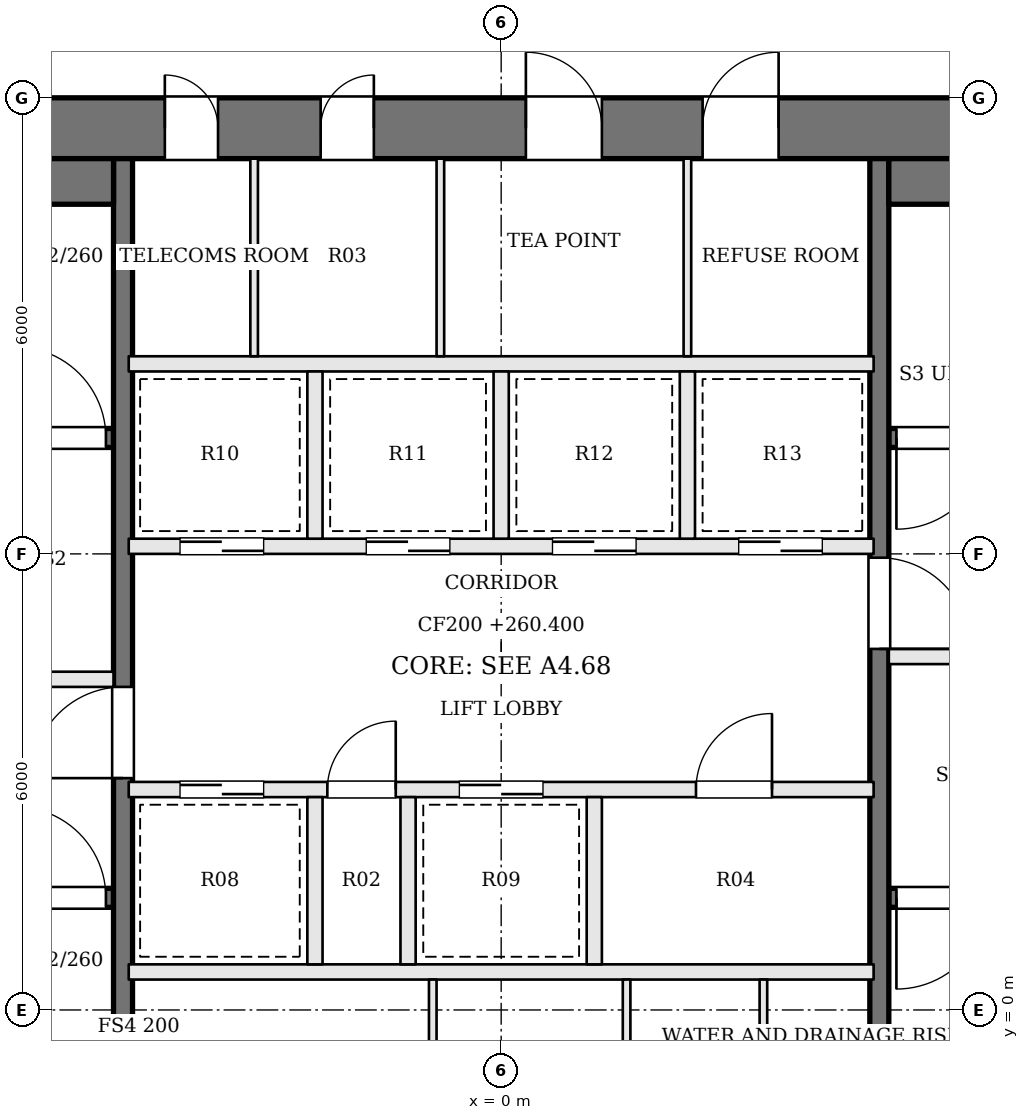
"""IFC4 building model, lengths in metres.
Left out: names, types, materials, properties, quantities, classifications, styles, units other than length and angle.
Written with IfcOpenShell. Run it as: python <this file> out.ifc"""

import sys

from ifc_helpers import new_model, si_unit, direction, frame, frame_2d, origin, place, context, subcontext, project, spatial, rectangle, extrude, element, fill, save


model = new_model("IFC4")
c1 = context("Model", 3, precision=1e-05, world=origin(), true_north=direction((0.0, 1.0)))
c2 = subcontext(c1, "Body", "Model", "MODEL_VIEW")
j1 = project(units=[si_unit("LENGTHUNIT", "METRE"), si_unit("PLANEANGLEUNIT", "RADIAN")], contexts=[c1])
p1 = place(None, origin())
s1 = spatial("IfcSite", under=j1, at=p1, CompositionType="ELEMENT")
p2 = place(p1, origin())
s2 = spatial("IfcBuilding", under=s1, at=p2, CompositionType="ELEMENT")
p3 = place(p2, frame((0.0, 0.0, 260.4)))
s3 = spatial("IfcBuildingStorey", under=s2, at=p3, CompositionType="ELEMENT", Elevation=260.4)
p4 = place(p3, frame((-13.0, 11.6, 0.0), z_axis=(0.0, 0.0, 1.0), x_axis=(1.0, 0.0, 0.0)))
e1 = element("IfcWall", 1, at=p4, inside=s3, PredefinedType="SHEAR", context=c2, shape_type="SweptSolid", body=[
    extrude(rectangle(XDim=26.0, YDim=0.8, at=frame_2d((13.0, 0.0))), origin(), (0.0, 0.0, 1.0), 3.9),
])
p5 = place(p4, frame((8.575, 0.0, 0.0)))
e2 = element("IfcOpeningElement", 2, at=p5, cuts=e1, PredefinedType="OPENING", context=c2, shape_type="SweptSolid", body=[
    extrude(rectangle(XDim=0.7, YDim=2.1, at=frame_2d((0.35, 1.05))), frame((0.0, 0.41, 0.0), z_axis=(0.0, -1.0, 0.0), x_axis=(1.0, 0.0, 0.0)), (0.0, 0.0, 1.0), 0.82),
])
p6 = place(p4, frame((10.625, 0.0, 0.0)))
e3 = element("IfcOpeningElement", 3, at=p6, cuts=e1, PredefinedType="OPENING", context=c2, shape_type="SweptSolid", body=[
    extrude(rectangle(XDim=0.7, YDim=2.1, at=frame_2d((0.35, 1.05))), frame((0.0, 0.41, 0.0), z_axis=(0.0, -1.0, 0.0), x_axis=(1.0, 0.0, 0.0)), (0.0, 0.0, 1.0), 0.82),
])
p7 = place(p4, frame((13.325, 0.0, 0.0)))
e4 = element("IfcOpeningElement", 4, at=p7, cuts=e1, PredefinedType="OPENING", context=c2, shape_type="SweptSolid", body=[
    extrude(rectangle(XDim=1.0, YDim=2.1, at=frame_2d((0.5, 1.05))), frame((0.0, 0.41, 0.0), z_axis=(0.0, -1.0, 0.0), x_axis=(1.0, 0.0, 0.0)), (0.0, 0.0, 1.0), 0.82),
])
p8 = place(p4, frame((15.65, 0.0, 0.0)))
e5 = element("IfcOpeningElement", 5, at=p8, cuts=e1, PredefinedType="OPENING", context=c2, shape_type="SweptSolid", body=[
    extrude(rectangle(XDim=1.0, YDim=2.1, at=frame_2d((0.5, 1.05))), frame((0.0, 0.41, 0.0), z_axis=(0.0, -1.0, 0.0), x_axis=(1.0, 0.0, 0.0)), (0.0, 0.0, 1.0), 0.82),
])
p9 = place(p3, frame((-12.2, 1.475, 0.0), z_axis=(0.0, 0.0, 1.0), x_axis=(1.0, 0.0, 0.0)))
e6 = element("IfcWall", 6, at=p9, inside=s3, PredefinedType="SOLIDWALL", context=c2, shape_type="SweptSolid", body=[
    extrude(rectangle(XDim=7.1, YDim=0.25, at=frame_2d((3.55, 0.0))), origin(), (0.0, 0.0, 1.0), 3.6),
])
p10 = place(p9, frame((5.8, 0.0, 0.0)))
e7 = element("IfcOpeningElement", 7, at=p10, cuts=e6, PredefinedType="OPENING", context=c2, shape_type="SweptSolid", body=[
    extrude(rectangle(XDim=1.2, YDim=2.1, at=frame_2d((0.6, 1.05))), frame((0.0, 0.135, 0.0), z_axis=(0.0, -1.0, 0.0), x_axis=(1.0, 0.0, 0.0)), (0.0, 0.0, 1.0), 0.27),
])
p11 = place(p3, frame((12.2, 7.525, 0.0), z_axis=(0.0, 0.0, 1.0), x_axis=(-1.0, 0.0, 0.0)))
e8 = element("IfcWall", 8, at=p11, inside=s3, PredefinedType="SOLIDWALL", context=c2, shape_type="SweptSolid", body=[
    extrude(rectangle(XDim=7.1, YDim=0.25, at=frame_2d((3.55, 0.0))), origin(), (0.0, 0.0, 1.0), 3.6),
])
p12 = place(p11, frame((5.8, 0.0, 0.0)))
e9 = element("IfcOpeningElement", 9, at=p12, cuts=e8, PredefinedType="OPENING", context=c2, shape_type="SweptSolid", body=[
    extrude(rectangle(XDim=1.2, YDim=2.1, at=frame_2d((0.6, 1.05))), frame((0.0, 0.135, 0.0), z_axis=(0.0, -1.0, 0.0), x_axis=(1.0, 0.0, 0.0)), (0.0, 0.0, 1.0), 0.27),
])
p13 = place(p3, frame((-12.2, 4.35, 0.0), z_axis=(0.0, 0.0, 1.0), x_axis=(1.0, 0.0, 0.0)))
e10 = element("IfcWall", 10, at=p13, inside=s3, PredefinedType="SOLIDWALL", context=c2, shape_type="SweptSolid", body=[
    extrude(rectangle(XDim=7.1, YDim=0.2, at=frame_2d((3.55, 0.0))), origin(), (0.0, 0.0, 1.0), 3.6),
])
p14 = place(p13, frame((4.4, 0.0, 0.0)))
e11 = element("IfcOpeningElement", 11, at=p14, cuts=e10, PredefinedType="OPENING", context=c2, shape_type="SweptSolid", body=[
    extrude(rectangle(XDim=1.2, YDim=2.1, at=frame_2d((0.6, 1.05))), frame((0.0, 0.11, 0.0), z_axis=(0.0, -1.0, 0.0), x_axis=(1.0, 0.0, 0.0)), (0.0, 0.0, 1.0), 0.22),
])
p15 = place(p13, frame((1.1, 0.0, 0.0)))
e12 = element("IfcOpeningElement", 12, at=p15, cuts=e10, PredefinedType="OPENING", context=c2, shape_type="SweptSolid", body=[
    extrude(rectangle(XDim=1.2, YDim=2.1, at=frame_2d((0.6, 1.05))), frame((0.0, 0.11, 0.0), z_axis=(0.0, -1.0, 0.0), x_axis=(1.0, 0.0, 0.0)), (0.0, 0.0, 1.0), 0.22),
])
p16 = place(p3, frame((12.2, 4.65, 0.0), z_axis=(0.0, 0.0, 1.0), x_axis=(-1.0, 0.0, 0.0)))
e13 = element("IfcWall", 13, at=p16, inside=s3, PredefinedType="SOLIDWALL", context=c2, shape_type="SweptSolid", body=[
    extrude(rectangle(XDim=7.1, YDim=0.2, at=frame_2d((3.55, 0.0))), origin(), (0.0, 0.0, 1.0), 3.6),
])
p17 = place(p16, frame((4.4, 0.0, 0.0)))
e14 = element("IfcOpeningElement", 14, at=p17, cuts=e13, PredefinedType="OPENING", context=c2, shape_type="SweptSolid", body=[
    extrude(rectangle(XDim=1.2, YDim=2.1, at=frame_2d((0.6, 1.05))), frame((0.0, 0.11, 0.0), z_axis=(0.0, -1.0, 0.0), x_axis=(1.0, 0.0, 0.0)), (0.0, 0.0, 1.0), 0.22),
])
p18 = place(p16, frame((1.1, 0.0, 0.0)))
e15 = element("IfcOpeningElement", 15, at=p18, cuts=e13, PredefinedType="OPENING", context=c2, shape_type="SweptSolid", body=[
    extrude(rectangle(XDim=1.2, YDim=2.1, at=frame_2d((0.6, 1.05))), frame((0.0, 0.11, 0.0), z_axis=(0.0, -1.0, 0.0), x_axis=(1.0, 0.0, 0.0)), (0.0, 0.0, 1.0), 0.22),
])
p19 = place(p3, frame((-12.2, 7.525, 0.0), z_axis=(0.0, 0.0, 1.0), x_axis=(1.0, 0.0, 0.0)))
e16 = element("IfcWall", 16, at=p19, inside=s3, PredefinedType="SOLIDWALL", context=c2, shape_type="SweptSolid", body=[
    extrude(rectangle(XDim=7.1, YDim=0.25, at=frame_2d((3.55, 0.0))), origin(), (0.0, 0.0, 1.0), 3.6),
])
p20 = place(p19, frame((5.8, 0.0, 0.0)))
e17 = element("IfcOpeningElement", 17, at=p20, cuts=e16, PredefinedType="OPENING", context=c2, shape_type="SweptSolid", body=[
    extrude(rectangle(XDim=1.2, YDim=2.1, at=frame_2d((0.6, 1.05))), frame((0.0, 0.135, 0.0), z_axis=(0.0, -1.0, 0.0), x_axis=(1.0, 0.0, 0.0)), (0.0, 0.0, 1.0), 0.27),
])
p21 = place(p3, frame((12.2, 1.475, 0.0), z_axis=(0.0, 0.0, 1.0), x_axis=(-1.0, 0.0, 0.0)))
e18 = element("IfcWall", 18, at=p21, inside=s3, PredefinedType="SOLIDWALL", context=c2, shape_type="SweptSolid", body=[
    extrude(rectangle(XDim=7.1, YDim=0.25, at=frame_2d((3.55, 0.0))), origin(), (0.0, 0.0, 1.0), 3.6),
])
p22 = place(p21, frame((5.8, 0.0, 0.0)))
e19 = element("IfcOpeningElement", 19, at=p22, cuts=e18, PredefinedType="OPENING", context=c2, shape_type="SweptSolid", body=[
    extrude(rectangle(XDim=1.2, YDim=2.1, at=frame_2d((0.6, 1.05))), frame((0.0, 0.135, 0.0), z_axis=(0.0, -1.0, 0.0), x_axis=(1.0, 0.0, 0.0)), (0.0, 0.0, 1.0), 0.27),
])
p23 = place(p3, frame((-4.975, -2.2, 0.0), z_axis=(0.0, 0.0, 1.0), x_axis=(0.0, 1.0, 0.0)))
e20 = element("IfcWall", 20, at=p23, inside=s3, PredefinedType="SOLIDWALL", context=c2, shape_type="SweptSolid", body=[
    extrude(rectangle(XDim=13.4, YDim=0.25, at=frame_2d((6.7, 0.0))), origin(), (0.0, 0.0, 1.0), 3.6),
])
p24 = place(p23, frame((5.25, 0.0, 0.0)))
e21 = element("IfcOpeningElement", 21, at=p24, cuts=e20, PredefinedType="OPENING", context=c2, shape_type="SweptSolid", body=[
    extrude(rectangle(XDim=1.2, YDim=2.1, at=frame_2d((0.6, 1.05))), frame((0.0, 0.135, 0.0), z_axis=(0.0, -1.0, 0.0), x_axis=(1.0, 0.0, 0.0)), (0.0, 0.0, 1.0), 0.27),
])
p25 = place(p3, frame((4.975, 11.2, 0.0), z_axis=(0.0, 0.0, 1.0), x_axis=(0.0, -1.0, 0.0)))
e22 = element("IfcWall", 22, at=p25, inside=s3, PredefinedType="SOLIDWALL", context=c2, shape_type="SweptSolid", body=[
    extrude(rectangle(XDim=13.4, YDim=0.25, at=frame_2d((6.7, 0.0))), origin(), (0.0, 0.0, 1.0), 3.6),
])
p26 = place(p25, frame((5.25, 0.0, 0.0)))
e23 = element("IfcOpeningElement", 23, at=p26, cuts=e22, PredefinedType="OPENING", context=c2, shape_type="SweptSolid", body=[
    extrude(rectangle(XDim=1.2, YDim=2.1, at=frame_2d((0.6, 1.05))), frame((0.0, 0.135, 0.0), z_axis=(0.0, -1.0, 0.0), x_axis=(1.0, 0.0, 0.0)), (0.0, 0.0, 1.0), 0.27),
])
for number, where, z_axis, x_axis in (
    (24, (-12.2, 10.9, 0.0), (0.0, 0.0, 1.0), (1.0, 0.0, 0.0)),
    (25, (12.2, 10.9, 0.0), (0.0, 0.0, 1.0), (-1.0, 0.0, 0.0)),
):
    element("IfcWall", number, at=place(p3, frame(where, z_axis=z_axis, x_axis=x_axis)), inside=s3, PredefinedType="SOLIDWALL", context=c2, shape_type="SweptSolid", body=[
        extrude(rectangle(XDim=7.1, YDim=0.6, at=frame_2d((3.55, 0.0))), origin(), (0.0, 0.0, 1.0), 3.6),
    ])
p27 = place(p3, frame((-4.9, 0.5, 0.0), z_axis=(0.0, 0.0, 1.0), x_axis=(1.0, 0.0, 0.0)))
e26 = element("IfcWall", 26, at=p27, inside=s3, PredefinedType="SOLIDWALL", context=c2, shape_type="SweptSolid", body=[
    extrude(rectangle(XDim=9.8, YDim=0.2, at=frame_2d((4.9, 0.0))), origin(), (0.0, 0.0, 1.0), 3.6),
])
p28 = place(p3, frame((-4.9, 2.9, 0.0), z_axis=(0.0, 0.0, 1.0), x_axis=(1.0, 0.0, 0.0)))
e27 = element("IfcWall", 27, at=p28, inside=s3, PredefinedType="SOLIDWALL", context=c2, shape_type="SweptSolid", body=[
    extrude(rectangle(XDim=9.8, YDim=0.2, at=frame_2d((4.9, 0.0))), origin(), (0.0, 0.0, 1.0), 3.6),
])
p29 = place(p28, frame((0.675, 0.0, 0.0)))
e28 = element("IfcOpeningElement", 28, at=p29, cuts=e27, PredefinedType="OPENING", context=c2, shape_type="SweptSolid", body=[
    extrude(rectangle(XDim=1.1, YDim=2.1, at=frame_2d((0.55, 1.05))), frame((0.0, 0.11, 0.0), z_axis=(0.0, -1.0, 0.0), x_axis=(1.0, 0.0, 0.0)), (0.0, 0.0, 1.0), 0.22),
])
p30 = place(p28, frame((2.613, 0.0, 0.0)))
e29 = element("IfcOpeningElement", 29, at=p30, cuts=e27, PredefinedType="OPENING", context=c2, shape_type="SweptSolid", body=[
    extrude(rectangle(XDim=0.9, YDim=2.1, at=frame_2d((0.45, 1.05))), frame((0.0, 0.11, 0.0), z_axis=(0.0, -1.0, 0.0), x_axis=(1.0, 0.0, 0.0)), (0.0, 0.0, 1.0), 0.22),
])
p31 = place(p28, frame((4.35, 0.0, 0.0)))
e30 = element("IfcOpeningElement", 30, at=p31, cuts=e27, PredefinedType="OPENING", context=c2, shape_type="SweptSolid", body=[
    extrude(rectangle(XDim=1.1, YDim=2.1, at=frame_2d((0.55, 1.05))), frame((0.0, 0.11, 0.0), z_axis=(0.0, -1.0, 0.0), x_axis=(1.0, 0.0, 0.0)), (0.0, 0.0, 1.0), 0.22),
])
p32 = place(p28, frame((7.463, 0.0, 0.0)))
e31 = element("IfcOpeningElement", 31, at=p32, cuts=e27, PredefinedType="OPENING", context=c2, shape_type="SweptSolid", body=[
    extrude(rectangle(XDim=1.0, YDim=2.1, at=frame_2d((0.5, 1.05))), frame((0.0, 0.11, 0.0), z_axis=(0.0, -1.0, 0.0), x_axis=(1.0, 0.0, 0.0)), (0.0, 0.0, 1.0), 0.22),
])
p33 = place(p3, frame((-4.9, 6.1, 0.0), z_axis=(0.0, 0.0, 1.0), x_axis=(1.0, 0.0, 0.0)))
e32 = element("IfcWall", 32, at=p33, inside=s3, PredefinedType="SOLIDWALL", context=c2, shape_type="SweptSolid", body=[
    extrude(rectangle(XDim=9.8, YDim=0.2, at=frame_2d((4.9, 0.0))), origin(), (0.0, 0.0, 1.0), 3.6),
])
p34 = place(p33, frame((0.675, 0.0, 0.0)))
e33 = element("IfcOpeningElement", 33, at=p34, cuts=e32, PredefinedType="OPENING", context=c2, shape_type="SweptSolid", body=[
    extrude(rectangle(XDim=1.1, YDim=2.1, at=frame_2d((0.55, 1.05))), frame((0.0, 0.11, 0.0), z_axis=(0.0, -1.0, 0.0), x_axis=(1.0, 0.0, 0.0)), (0.0, 0.0, 1.0), 0.22),
])
p35 = place(p33, frame((3.125, 0.0, 0.0)))
e34 = element("IfcOpeningElement", 34, at=p35, cuts=e32, PredefinedType="OPENING", context=c2, shape_type="SweptSolid", body=[
    extrude(rectangle(XDim=1.1, YDim=2.1, at=frame_2d((0.55, 1.05))), frame((0.0, 0.11, 0.0), z_axis=(0.0, -1.0, 0.0), x_axis=(1.0, 0.0, 0.0)), (0.0, 0.0, 1.0), 0.22),
])
p36 = place(p33, frame((5.575, 0.0, 0.0)))
e35 = element("IfcOpeningElement", 35, at=p36, cuts=e32, PredefinedType="OPENING", context=c2, shape_type="SweptSolid", body=[
    extrude(rectangle(XDim=1.1, YDim=2.1, at=frame_2d((0.55, 1.05))), frame((0.0, 0.11, 0.0), z_axis=(0.0, -1.0, 0.0), x_axis=(1.0, 0.0, 0.0)), (0.0, 0.0, 1.0), 0.22),
])
p37 = place(p33, frame((8.025, 0.0, 0.0)))
e36 = element("IfcOpeningElement", 36, at=p37, cuts=e32, PredefinedType="OPENING", context=c2, shape_type="SweptSolid", body=[
    extrude(rectangle(XDim=1.1, YDim=2.1, at=frame_2d((0.55, 1.05))), frame((0.0, 0.11, 0.0), z_axis=(0.0, -1.0, 0.0), x_axis=(1.0, 0.0, 0.0)), (0.0, 0.0, 1.0), 0.22),
])
p38 = place(p3, frame((-4.9, 8.5, 0.0), z_axis=(0.0, 0.0, 1.0), x_axis=(1.0, 0.0, 0.0)))
e37 = element("IfcWall", 37, at=p38, inside=s3, PredefinedType="SOLIDWALL", context=c2, shape_type="SweptSolid", body=[
    extrude(rectangle(XDim=9.8, YDim=0.2, at=frame_2d((4.9, 0.0))), origin(), (0.0, 0.0, 1.0), 3.6),
])
for number, where, z_axis, x_axis in (
    (38, (-2.45, 0.6, 0.0), (0.0, 0.0, 1.0), (0.0, 1.0, 0.0)),
    (39, (-1.225, 0.6, 0.0), (0.0, 0.0, 1.0), (0.0, 1.0, 0.0)),
    (40, (1.225, 0.6, 0.0), (0.0, 0.0, 1.0), (0.0, 1.0, 0.0)),
    (41, (-2.45, 6.2, 0.0), (0.0, 0.0, 1.0), (0.0, 1.0, 0.0)),
    (42, (0.0, 6.2, 0.0), (0.0, 0.0, 1.0), (0.0, 1.0, 0.0)),
    (43, (2.45, 6.2, 0.0), (0.0, 0.0, 1.0), (0.0, 1.0, 0.0)),
):
    element("IfcWall", number, at=place(p3, frame(where, z_axis=z_axis, x_axis=x_axis)), inside=s3, PredefinedType="SOLIDWALL", context=c2, shape_type="SweptSolid", body=[
        extrude(rectangle(XDim=2.2, YDim=0.2, at=frame_2d((1.1, 0.0))), origin(), (0.0, 0.0, 1.0), 3.6),
    ])
for number, where, z_axis, x_axis in (
    (44, (-0.9, -2.2, 0.0), (0.0, 0.0, 1.0), (0.0, 1.0, 0.0)),
    (45, (1.65, -2.2, 0.0), (0.0, 0.0, 1.0), (0.0, 1.0, 0.0)),
    (46, (3.45, -2.2, 0.0), (0.0, 0.0, 1.0), (0.0, 1.0, 0.0)),
    (47, (-3.25, 8.6, 0.0), (0.0, 0.0, 1.0), (0.0, 1.0, 0.0)),
    (48, (-0.8, 8.6, 0.0), (0.0, 0.0, 1.0), (0.0, 1.0, 0.0)),
    (49, (2.45, 8.6, 0.0), (0.0, 0.0, 1.0), (0.0, 1.0, 0.0)),
):
    element("IfcWall", number, at=place(p3, frame(where, z_axis=z_axis, x_axis=x_axis)), inside=s3, PredefinedType="PARTITIONING", context=c2, shape_type="SweptSolid", body=[
        extrude(rectangle(XDim=2.6, YDim=0.1, at=frame_2d((1.3, 0.0))), origin(), (0.0, 0.0, 1.0), 3.6),
    ])
p39 = place(p24, origin())
e50 = element("IfcDoor", 50, at=p39, inside=s3, OperationType="SINGLE_SWING_LEFT", PredefinedType="DOOR", context=c2, shape_type="SweptSolid", body=[
    extrude(rectangle(XDim=1.2, YDim=2.1, at=frame_2d((0.6, 1.05))), frame((0.0, 0.025, 0.0), z_axis=(0.0, -1.0, 0.0), x_axis=(1.0, 0.0, 0.0)), (0.0, 0.0, 1.0), 0.05),
])
fill(e21, e50)
p40 = place(p26, origin())
e51 = element("IfcDoor", 51, at=p40, inside=s3, OperationType="SINGLE_SWING_RIGHT", PredefinedType="DOOR", context=c2, shape_type="SweptSolid", body=[
    extrude(rectangle(XDim=1.2, YDim=2.1, at=frame_2d((0.6, 1.05))), frame((0.0, 0.025, 0.0), z_axis=(0.0, -1.0, 0.0), x_axis=(1.0, 0.0, 0.0)), (0.0, 0.0, 1.0), 0.05),
])
fill(e23, e51)
p41 = place(p10, origin())
e52 = element("IfcDoor", 52, at=p41, inside=s3, OperationType="SINGLE_SWING_LEFT", PredefinedType="DOOR", context=c2, shape_type="SweptSolid", body=[
    extrude(rectangle(XDim=1.2, YDim=2.1, at=frame_2d((0.6, 1.05))), frame((0.0, 0.025, 0.0), z_axis=(0.0, -1.0, 0.0), x_axis=(1.0, 0.0, 0.0)), (0.0, 0.0, 1.0), 0.05),
])
fill(e7, e52)
p42 = place(p12, origin())
e53 = element("IfcDoor", 53, at=p42, inside=s3, OperationType="SINGLE_SWING_RIGHT", PredefinedType="DOOR", context=c2, shape_type="SweptSolid", body=[
    extrude(rectangle(XDim=1.2, YDim=2.1, at=frame_2d((0.6, 1.05))), frame((0.0, 0.025, 0.0), z_axis=(0.0, -1.0, 0.0), x_axis=(1.0, 0.0, 0.0)), (0.0, 0.0, 1.0), 0.05),
])
fill(e9, e53)
p43 = place(p20, origin())
e54 = element("IfcDoor", 54, at=p43, inside=s3, OperationType="SINGLE_SWING_LEFT", PredefinedType="DOOR", context=c2, shape_type="SweptSolid", body=[
    extrude(rectangle(XDim=1.2, YDim=2.1, at=frame_2d((0.6, 1.05))), frame((0.0, 0.025, 0.0), z_axis=(0.0, -1.0, 0.0), x_axis=(1.0, 0.0, 0.0)), (0.0, 0.0, 1.0), 0.05),
])
fill(e17, e54)
p44 = place(p22, origin())
e55 = element("IfcDoor", 55, at=p44, inside=s3, OperationType="SINGLE_SWING_RIGHT", PredefinedType="DOOR", context=c2, shape_type="SweptSolid", body=[
    extrude(rectangle(XDim=1.2, YDim=2.1, at=frame_2d((0.6, 1.05))), frame((0.0, 0.025, 0.0), z_axis=(0.0, -1.0, 0.0), x_axis=(1.0, 0.0, 0.0)), (0.0, 0.0, 1.0), 0.05),
])
fill(e19, e55)
p45 = place(p29, origin())
e56 = element("IfcDoor", 56, at=p45, inside=s3, OperationType="SLIDING_TO_RIGHT", PredefinedType="DOOR", context=c2, shape_type="SweptSolid", body=[
    extrude(rectangle(XDim=1.1, YDim=2.1, at=frame_2d((0.55, 1.05))), frame((0.0, 0.025, 0.0), z_axis=(0.0, -1.0, 0.0), x_axis=(1.0, 0.0, 0.0)), (0.0, 0.0, 1.0), 0.05),
])
fill(e28, e56)
p46 = place(p30, origin())
e57 = element("IfcDoor", 57, at=p46, inside=s3, OperationType="SINGLE_SWING_RIGHT", PredefinedType="DOOR", context=c2, shape_type="SweptSolid", body=[
    extrude(rectangle(XDim=0.9, YDim=2.1, at=frame_2d((0.45, 1.05))), frame((0.0, 0.025, 0.0), z_axis=(0.0, -1.0, 0.0), x_axis=(1.0, 0.0, 0.0)), (0.0, 0.0, 1.0), 0.05),
])
fill(e29, e57)
p47 = place(p31, origin())
e58 = element("IfcDoor", 58, at=p47, inside=s3, OperationType="SLIDING_TO_LEFT", PredefinedType="DOOR", context=c2, shape_type="SweptSolid", body=[
    extrude(rectangle(XDim=1.1, YDim=2.1, at=frame_2d((0.55, 1.05))), frame((0.0, 0.025, 0.0), z_axis=(0.0, -1.0, 0.0), x_axis=(1.0, 0.0, 0.0)), (0.0, 0.0, 1.0), 0.05),
])
fill(e30, e58)
p48 = place(p32, origin())
e59 = element("IfcDoor", 59, at=p48, inside=s3, OperationType="SINGLE_SWING_RIGHT", PredefinedType="DOOR", context=c2, shape_type="SweptSolid", body=[
    extrude(rectangle(XDim=1.0, YDim=2.1, at=frame_2d((0.5, 1.05))), frame((0.0, 0.025, 0.0), z_axis=(0.0, -1.0, 0.0), x_axis=(1.0, 0.0, 0.0)), (0.0, 0.0, 1.0), 0.05),
])
fill(e31, e59)
p49 = place(p34, origin())
e60 = element("IfcDoor", 60, at=p49, inside=s3, OperationType="SLIDING_TO_RIGHT", PredefinedType="DOOR", context=c2, shape_type="SweptSolid", body=[
    extrude(rectangle(XDim=1.1, YDim=2.1, at=frame_2d((0.55, 1.05))), frame((0.0, 0.025, 0.0), z_axis=(0.0, -1.0, 0.0), x_axis=(1.0, 0.0, 0.0)), (0.0, 0.0, 1.0), 0.05),
])
fill(e33, e60)
p50 = place(p35, origin())
e61 = element("IfcDoor", 61, at=p50, inside=s3, OperationType="SLIDING_TO_LEFT", PredefinedType="DOOR", context=c2, shape_type="SweptSolid", body=[
    extrude(rectangle(XDim=1.1, YDim=2.1, at=frame_2d((0.55, 1.05))), frame((0.0, 0.025, 0.0), z_axis=(0.0, -1.0, 0.0), x_axis=(1.0, 0.0, 0.0)), (0.0, 0.0, 1.0), 0.05),
])
fill(e34, e61)
p51 = place(p36, origin())
e62 = element("IfcDoor", 62, at=p51, inside=s3, OperationType="SLIDING_TO_RIGHT", PredefinedType="DOOR", context=c2, shape_type="SweptSolid", body=[
    extrude(rectangle(XDim=1.1, YDim=2.1, at=frame_2d((0.55, 1.05))), frame((0.0, 0.025, 0.0), z_axis=(0.0, -1.0, 0.0), x_axis=(1.0, 0.0, 0.0)), (0.0, 0.0, 1.0), 0.05),
])
fill(e35, e62)
p52 = place(p37, origin())
e63 = element("IfcDoor", 63, at=p52, inside=s3, OperationType="SLIDING_TO_LEFT", PredefinedType="DOOR", context=c2, shape_type="SweptSolid", body=[
    extrude(rectangle(XDim=1.1, YDim=2.1, at=frame_2d((0.55, 1.05))), frame((0.0, 0.025, 0.0), z_axis=(0.0, -1.0, 0.0), x_axis=(1.0, 0.0, 0.0)), (0.0, 0.0, 1.0), 0.05),
])
fill(e36, e63)
p53 = place(p5, origin())
e64 = element("IfcDoor", 64, at=p53, inside=s3, OperationType="SINGLE_SWING_LEFT", PredefinedType="DOOR", context=c2, shape_type="SweptSolid", body=[
    extrude(rectangle(XDim=0.7, YDim=2.1, at=frame_2d((0.35, 1.05))), frame((0.0, 0.025, 0.0), z_axis=(0.0, -1.0, 0.0), x_axis=(1.0, 0.0, 0.0)), (0.0, 0.0, 1.0), 0.05),
])
fill(e2, e64)
p54 = place(p6, origin())
e65 = element("IfcDoor", 65, at=p54, inside=s3, OperationType="SINGLE_SWING_RIGHT", PredefinedType="DOOR", context=c2, shape_type="SweptSolid", body=[
    extrude(rectangle(XDim=0.7, YDim=2.1, at=frame_2d((0.35, 1.05))), frame((0.0, 0.025, 0.0), z_axis=(0.0, -1.0, 0.0), x_axis=(1.0, 0.0, 0.0)), (0.0, 0.0, 1.0), 0.05),
])
fill(e3, e65)
p55 = place(p7, origin())
e66 = element("IfcDoor", 66, at=p55, inside=s3, OperationType="SINGLE_SWING_LEFT", PredefinedType="DOOR", context=c2, shape_type="SweptSolid", body=[
    extrude(rectangle(XDim=1.0, YDim=2.1, at=frame_2d((0.5, 1.05))), frame((0.0, 0.025, 0.0), z_axis=(0.0, -1.0, 0.0), x_axis=(1.0, 0.0, 0.0)), (0.0, 0.0, 1.0), 0.05),
])
fill(e4, e66)
p56 = place(p8, origin())
e67 = element("IfcDoor", 67, at=p56, inside=s3, OperationType="SINGLE_SWING_RIGHT", PredefinedType="DOOR", context=c2, shape_type="SweptSolid", body=[
    extrude(rectangle(XDim=1.0, YDim=2.1, at=frame_2d((0.5, 1.05))), frame((0.0, 0.025, 0.0), z_axis=(0.0, -1.0, 0.0), x_axis=(1.0, 0.0, 0.0)), (0.0, 0.0, 1.0), 0.05),
])
fill(e5, e67)
save(model, sys.argv[1])
